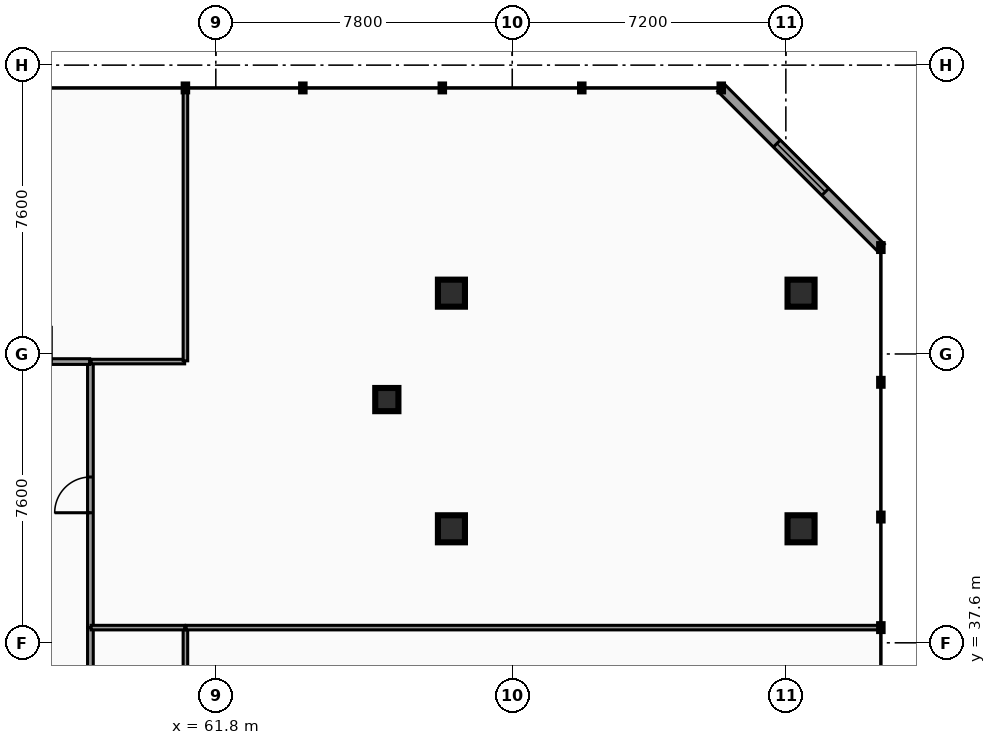
"""IFC4 building model, lengths in metres.
Left out: names, types, materials, properties, quantities, classifications, styles, units other than length and angle.
Written with IfcOpenShell. Run it as: python <this file> out.ifc"""

import sys

from ifc_helpers import new_model, si_unit, direction, frame, frame_2d, origin, origin_2d, place, context, subcontext, project, spatial, rectangle, hollow_circle, extrude, element, fill, save


model = new_model("IFC4")
c1 = context("Model", 3, precision=1e-05, world=origin(), true_north=direction((0.0, 1.0)))
c2 = subcontext(c1, "Body", "Model", "MODEL_VIEW")
j1 = project(units=[si_unit("LENGTHUNIT", "METRE"), si_unit("PLANEANGLEUNIT", "RADIAN")], contexts=[c1])
p1 = place(None, origin())
s1 = spatial("IfcSite", under=j1, at=p1, CompositionType="ELEMENT")
p2 = place(p1, origin())
s2 = spatial("IfcBuilding", under=s1, at=p2, CompositionType="ELEMENT")
p3 = place(p2, frame((0.0, 0.0, 5.1)))
s3 = spatial("IfcBuildingStorey", under=s2, at=p3, CompositionType="ELEMENT", Elevation=5.1)
p4 = place(p3, frame((66.3, 44.0, 0.0), z_axis=(0.0, 0.0, 1.0), x_axis=(1.0, 0.0, 0.0)))
e1 = element("IfcColumn", 1, at=p4, inside=s3, PredefinedType="COLUMN", context=c2, shape_type="SweptSolid", body=[
    extrude(hollow_circle(Radius=0.305, WallThickness=0.025, at=origin_2d()), origin(), (0.0, 0.0, 1.0), 4.14),
])
p5 = place(p3, frame((77.2, 40.6, 0.0), z_axis=(0.0, 0.0, 1.0), x_axis=(1.0, 0.0, 0.0)))
e2 = element("IfcColumn", 2, at=p5, inside=s3, PredefinedType="COLUMN", context=c2, shape_type="SweptSolid", body=[
    extrude(hollow_circle(Radius=0.355, WallThickness=0.03, at=origin_2d()), origin(), (0.0, 0.0, 1.0), 4.11),
])
p6 = place(p3, frame((68.0, 40.6, 0.0), z_axis=(0.0, 0.0, 1.0), x_axis=(1.0, 0.0, 0.0)))
e3 = element("IfcColumn", 3, at=p6, inside=s3, PredefinedType="COLUMN", context=c2, shape_type="SweptSolid", body=[
    extrude(hollow_circle(Radius=0.355, WallThickness=0.03, at=origin_2d()), origin(), (0.0, 0.0, 1.0), 4.14),
])
p7 = place(p3, frame((77.2, 46.8, 0.0), z_axis=(0.0, 0.0, 1.0), x_axis=(1.0, 0.0, 0.0)))
e4 = element("IfcColumn", 4, at=p7, inside=s3, PredefinedType="COLUMN", context=c2, shape_type="SweptSolid", body=[
    extrude(hollow_circle(Radius=0.355, WallThickness=0.03, at=origin_2d()), origin(), (0.0, 0.0, 1.0), 4.11),
])
p8 = place(p3, frame((68.0, 46.8, 0.0), z_axis=(0.0, 0.0, 1.0), x_axis=(1.0, 0.0, 0.0)))
e5 = element("IfcColumn", 5, at=p8, inside=s3, PredefinedType="COLUMN", context=c2, shape_type="SweptSolid", body=[
    extrude(hollow_circle(Radius=0.355, WallThickness=0.03, at=origin_2d()), origin(), (0.0, 0.0, 1.0), 4.14),
])
p9 = place(p3, frame((75.1, 52.2, 0.0), z_axis=(0.0, 0.0, 1.0), x_axis=(0.707106781187, -0.707106781187, 0.0)))
e6 = element("IfcWall", 6, at=p9, inside=s3, PredefinedType="STANDARD", context=c2, shape_type="SweptSolid", body=[
    extrude(rectangle(XDim=5.94, YDim=0.26, at=frame_2d((2.97, 0.0))), origin(), (0.0, 0.0, 1.0), 3.65),
])
p10 = place(p9, frame((2.07, 0.0, 0.7)))
e7 = element("IfcOpeningElement", 7, at=p10, cuts=e6, PredefinedType="OPENING", context=c2, shape_type="SweptSolid", body=[
    extrude(rectangle(XDim=1.8, YDim=2.1, at=frame_2d((0.9, 1.05))), frame((0.0, 0.14, 0.0), z_axis=(0.0, -1.0, 0.0), x_axis=(1.0, 0.0, 0.0)), (0.0, 0.0, 1.0), 0.28),
])
p11 = place(p3, frame((58.5, 30.17, 0.0), z_axis=(0.0, 0.0, 1.0), x_axis=(0.0, 1.0, 0.0)))
e8 = element("IfcWall", 8, at=p11, inside=s3, PredefinedType="PARTITIONING", context=c2, shape_type="SweptSolid", body=[
    extrude(rectangle(XDim=7.825, YDim=0.15, at=frame_2d((3.913, 0.0))), origin(), (0.0, 0.0, 1.0), 3.097),
])
p12 = place(p11, frame((3.353, 0.0, 0.0)))
e9 = element("IfcOpeningElement", 9, at=p12, cuts=e8, PredefinedType="OPENING", context=c2, shape_type="SweptSolid", body=[
    extrude(rectangle(XDim=1.12, YDim=2.05, at=frame_2d((0.56, 1.025))), frame((0.0, 0.085, 0.0), z_axis=(0.0, -1.0, 0.0), x_axis=(1.0, 0.0, 0.0)), (0.0, 0.0, 1.0), 0.17),
])
p13 = place(p3, frame((58.5, 38.005, 0.0), z_axis=(0.0, 0.0, 1.0), x_axis=(0.0, 1.0, 0.0)))
e10 = element("IfcWall", 10, at=p13, inside=s3, PredefinedType="PARTITIONING", context=c2, shape_type="SweptSolid", body=[
    extrude(rectangle(XDim=6.975, YDim=0.15, at=frame_2d((3.488, 0.0))), origin(), (0.0, 0.0, 1.0), 3.097),
])
p14 = place(p13, frame((3.018, 0.0, 0.0)))
e11 = element("IfcOpeningElement", 11, at=p14, cuts=e10, PredefinedType="OPENING", context=c2, shape_type="SweptSolid", body=[
    extrude(rectangle(XDim=0.94, YDim=2.05, at=frame_2d((0.47, 1.025))), frame((0.0, 0.085, 0.0), z_axis=(0.0, -1.0, 0.0), x_axis=(1.0, 0.0, 0.0)), (0.0, 0.0, 1.0), 0.17),
])
p15 = place(p3, frame((55.52, 45.0, 0.0), z_axis=(0.0, 0.0, 1.0), x_axis=(1.0, 0.0, 0.0)))
e12 = element("IfcWall", 12, at=p15, inside=s3, PredefinedType="PARTITIONING", context=c2, shape_type="SweptSolid", body=[
    extrude(rectangle(XDim=2.96, YDim=0.15, at=frame_2d((1.48, 0.0))), origin(), (0.0, 0.0, 1.0), 3.097),
])
p16 = place(p15, frame((1.01, 0.0, 0.0)))
e13 = element("IfcOpeningElement", 13, at=p16, cuts=e12, PredefinedType="OPENING", context=c2, shape_type="SweptSolid", body=[
    extrude(rectangle(XDim=0.94, YDim=2.05, at=frame_2d((0.47, 1.025))), frame((0.0, 0.085, 0.0), z_axis=(0.0, -1.0, 0.0), x_axis=(1.0, 0.0, 0.0)), (0.0, 0.0, 1.0), 0.17),
])
p17 = place(p3, frame((61.0, 30.17, 0.0), z_axis=(0.0, 0.0, 1.0), x_axis=(0.0, 1.0, 0.0)))
e14 = element("IfcWall", 14, at=p17, inside=s3, PredefinedType="PARTITIONING", context=c2, shape_type="SweptSolid", body=[
    extrude(rectangle(XDim=7.81, YDim=0.12, at=frame_2d((3.905, 0.0))), origin(), (0.0, 0.0, 1.0), 3.097),
])
p18 = place(p3, frame((61.02, 38.0, 0.0), z_axis=(0.0, 0.0, 1.0), x_axis=(1.0, 0.0, 0.0)))
e15 = element("IfcWall", 15, at=p18, inside=s3, PredefinedType="PARTITIONING", context=c2, shape_type="SweptSolid", body=[
    extrude(rectangle(XDim=18.265, YDim=0.12, at=frame_2d((9.132, 0.0))), origin(), (0.0, 0.0, 1.0), 3.097),
])
for number, where, z_axis, x_axis in (
    (16, (58.52, 38.0, 0.0), (0.0, 0.0, 1.0), (1.0, 0.0, 0.0)),
    (17, (58.52, 45.0, 0.0), (0.0, 0.0, 1.0), (1.0, 0.0, 0.0)),
):
    element("IfcWall", number, at=place(p3, frame(where, z_axis=z_axis, x_axis=x_axis)), inside=s3, PredefinedType="PARTITIONING", context=c2, shape_type="SweptSolid", body=[
        extrude(rectangle(XDim=2.46, YDim=0.12, at=frame_2d((1.23, 0.0))), origin(), (0.0, 0.0, 1.0), 3.097),
    ])
p19 = place(p3, frame((61.0, 45.02, 0.0), z_axis=(0.0, 0.0, 1.0), x_axis=(0.0, 1.0, 0.0)))
e18 = element("IfcWall", 18, at=p19, inside=s3, PredefinedType="PARTITIONING", context=c2, shape_type="SweptSolid", body=[
    extrude(rectangle(XDim=7.165, YDim=0.12, at=frame_2d((3.583, 0.0))), origin(), (0.0, 0.0, 1.0), 3.097),
])
p20 = place(p10, origin())
e19 = element("IfcWindow", 19, at=p20, inside=s3, PartitioningType="SINGLE_PANEL", PredefinedType="WINDOW", context=c2, shape_type="SweptSolid", body=[
    extrude(rectangle(XDim=1.8, YDim=2.1, at=frame_2d((0.9, 1.05))), frame((0.0, 0.03, 0.0), z_axis=(0.0, -1.0, 0.0), x_axis=(1.0, 0.0, 0.0)), (0.0, 0.0, 1.0), 0.06),
])
fill(e7, e19)
p21 = place(p14, origin())
e20 = element("IfcDoor", 20, at=p21, inside=s3, OperationType="SINGLE_SWING_LEFT", PredefinedType="DOOR", context=c2, shape_type="SweptSolid", body=[
    extrude(rectangle(XDim=0.94, YDim=2.05, at=frame_2d((0.47, 1.025))), frame((0.0, 0.025, 0.0), z_axis=(0.0, -1.0, 0.0), x_axis=(1.0, 0.0, 0.0)), (0.0, 0.0, 1.0), 0.05),
])
fill(e11, e20)
save(model, sys.argv[1])
